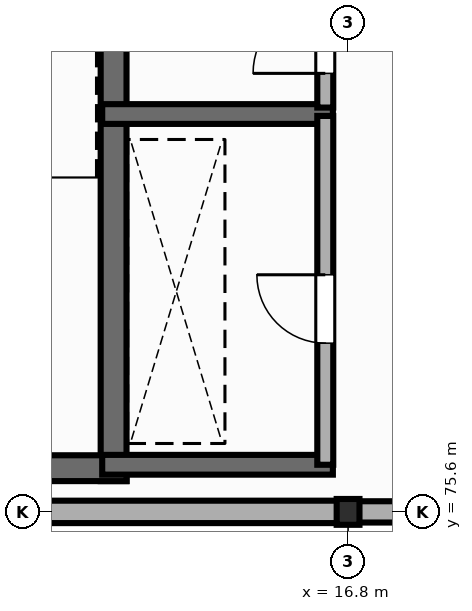
"""IFC4 building model, lengths in metres.
Left out: names, types, materials, properties, quantities, classifications, styles, units other than length and angle.
Written with IfcOpenShell. Run it as: python <this file> out.ifc"""

import sys

from ifc_helpers import new_model, si_unit, direction, frame, frame_2d, origin, origin_2d, place, context, subcontext, project, spatial, rectangle, i_section, extrude, element, fill, save


model = new_model("IFC4")
c1 = context("Model", 3, precision=1e-05, world=origin(), true_north=direction((0.0, 1.0)))
c2 = subcontext(c1, "Body", "Model", "MODEL_VIEW")
j1 = project(units=[si_unit("LENGTHUNIT", "METRE"), si_unit("PLANEANGLEUNIT", "RADIAN")], contexts=[c1])
p1 = place(None, origin())
s1 = spatial("IfcSite", under=j1, at=p1, CompositionType="ELEMENT")
p2 = place(p1, origin())
s2 = spatial("IfcBuilding", under=s1, at=p2, CompositionType="ELEMENT")
p3 = place(p2, frame((0.0, 0.0, 13.95)))
s3 = spatial("IfcBuildingStorey", under=s2, at=p3, CompositionType="ELEMENT", Elevation=13.95)
p4 = place(p3, frame((16.8, 75.6, 0.0), z_axis=(0.0, 0.0, 1.0), x_axis=(1.0, 0.0, 0.0)))
e1 = element("IfcColumn", 1, at=p4, inside=s3, PredefinedType="COLUMN", context=c2, shape_type="SweptSolid", body=[
    extrude(i_section(OverallWidth=0.3, OverallDepth=0.34, WebThickness=0.012, FlangeThickness=0.021, FilletRadius=0.027, at=origin_2d()), origin(), (0.0, 0.0, 1.0), 4.05),
])
p5 = place(p3, frame((8.408, 75.6, 0.0), z_axis=(0.0, 0.0, 1.0), x_axis=(1.0, 0.0, 0.0)))
e2 = element("IfcWall", 2, at=p5, inside=s3, PredefinedType="STANDARD", context=c2, shape_type="SweptSolid", body=[
    extrude(rectangle(XDim=8.384, YDim=0.295, at=frame_2d((4.192, 0.0))), origin(), (0.0, 0.0, 1.0), 3.487),
])
p6 = place(p3, frame((16.808, 75.6, 0.0), z_axis=(0.0, 0.0, 1.0), x_axis=(1.0, 0.0, 0.0)))
e3 = element("IfcWall", 3, at=p6, inside=s3, PredefinedType="STANDARD", context=c2, shape_type="SweptSolid", body=[
    extrude(rectangle(XDim=8.384, YDim=0.28, at=frame_2d((4.192, 0.0))), origin(), (0.0, 0.0, 1.0), 3.517),
])
p7 = place(p3, frame((13.715, 76.005, 0.0), z_axis=(0.0, 0.0, 1.0), x_axis=(0.0, 1.0, 0.0)))
e4 = element("IfcWall", 4, at=p7, inside=s3, PredefinedType="SHEAR", context=c2, shape_type="SweptSolid", body=[
    extrude(rectangle(XDim=9.99, YDim=0.34, at=frame_2d((4.995, 0.0))), origin(), (0.0, 0.0, 1.0), 3.85),
])
p8 = place(p3, frame((8.635, 76.175, 0.0), z_axis=(0.0, 0.0, 1.0), x_axis=(1.0, 0.0, 0.0)))
e5 = element("IfcWall", 5, at=p8, inside=s3, PredefinedType="SHEAR", context=c2, shape_type="SweptSolid", body=[
    extrude(rectangle(XDim=5.25, YDim=0.34, at=frame_2d((2.625, 0.0))), origin(), (0.0, 0.0, 1.0), 3.85),
])
for number, where, z_axis, x_axis in (
    (6, (13.565, 76.22, 0.0), (0.0, 0.0, 1.0), (1.0, 0.0, 0.0)),
    (7, (13.565, 80.835, 0.0), (0.0, 0.0, 1.0), (1.0, 0.0, 0.0)),
):
    element("IfcWall", number, at=place(p3, frame(where, z_axis=z_axis, x_axis=x_axis)), inside=s3, PredefinedType="SHEAR", context=c2, shape_type="SweptSolid", body=[
        extrude(rectangle(XDim=3.035, YDim=0.26, at=frame_2d((1.518, 0.0))), origin(), (0.0, 0.0, 1.0), 3.85),
    ])
p9 = place(p3, frame((16.5, 76.22, 0.0), z_axis=(0.0, 0.0, 1.0), x_axis=(0.0, 1.0, 0.0)))
e8 = element("IfcWall", 8, at=p9, inside=s3, PredefinedType="STANDARD", context=c2, shape_type="SweptSolid", body=[
    extrude(rectangle(XDim=4.59, YDim=0.21, at=frame_2d((2.295, 0.0))), origin(), (0.0, 0.0, 1.0), 3.357),
])
p10 = place(p9, frame((1.6, 0.0, 0.0)))
e9 = element("IfcOpeningElement", 9, at=p10, cuts=e8, PredefinedType="OPENING", context=c2, shape_type="SweptSolid", body=[
    extrude(rectangle(XDim=0.9, YDim=2.1, at=frame_2d((0.45, 1.05))), frame((0.0, 0.115, 0.0), z_axis=(0.0, -1.0, 0.0), x_axis=(1.0, 0.0, 0.0)), (0.0, 0.0, 1.0), 0.23),
])
p11 = place(p3, frame((16.5, 80.92, 0.0), z_axis=(0.0, 0.0, 1.0), x_axis=(0.0, 1.0, 0.0)))
e10 = element("IfcWall", 10, at=p11, inside=s3, PredefinedType="STANDARD", context=c2, shape_type="SweptSolid", body=[
    extrude(rectangle(XDim=4.48, YDim=0.21, at=frame_2d((2.24, 0.0))), origin(), (0.0, 0.0, 1.0), 3.357),
])
p12 = place(p11, frame((0.45, 0.0, 0.0)))
e11 = element("IfcOpeningElement", 11, at=p12, cuts=e10, PredefinedType="OPENING", context=c2, shape_type="SweptSolid", body=[
    extrude(rectangle(XDim=0.95, YDim=2.15, at=frame_2d((0.475, 1.075))), frame((0.0, 0.115, 0.0), z_axis=(0.0, -1.0, 0.0), x_axis=(1.0, 0.0, 0.0)), (0.0, 0.0, 1.0), 0.23),
])
p13 = place(p10, origin())
e12 = element("IfcDoor", 12, at=p13, inside=s3, OperationType="SINGLE_SWING_RIGHT", PredefinedType="DOOR", context=c2, shape_type="SweptSolid", body=[
    extrude(rectangle(XDim=0.9, YDim=2.1, at=frame_2d((0.45, 1.05))), frame((0.0, 0.025, 0.0), z_axis=(0.0, -1.0, 0.0), x_axis=(1.0, 0.0, 0.0)), (0.0, 0.0, 1.0), 0.05),
])
fill(e9, e12)
p14 = place(p12, origin())
e13 = element("IfcDoor", 13, at=p14, inside=s3, OperationType="SINGLE_SWING_LEFT", PredefinedType="DOOR", context=c2, shape_type="SweptSolid", body=[
    extrude(rectangle(XDim=0.95, YDim=2.15, at=frame_2d((0.475, 1.075))), frame((0.0, 0.025, 0.0), z_axis=(0.0, -1.0, 0.0), x_axis=(1.0, 0.0, 0.0)), (0.0, 0.0, 1.0), 0.05),
])
fill(e11, e13)
save(model, sys.argv[1])
